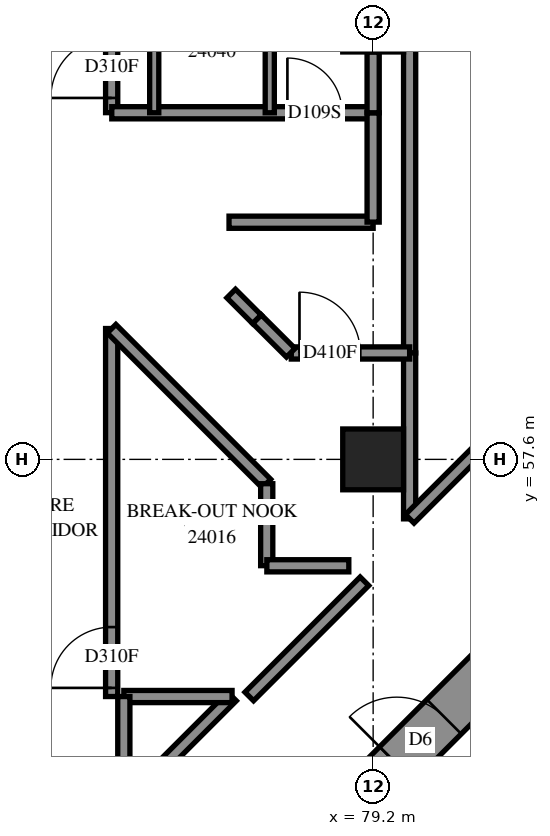
"""IFC4 building model, lengths in metres.
Left out: names, types, materials, properties, quantities, classifications, styles, units other than length and angle.
Written with IfcOpenShell. Run it as: python <this file> out.ifc"""

import sys

from ifc_helpers import new_model, si_unit, direction, frame, frame_2d, origin, origin_2d, place, context, subcontext, project, spatial, rectangle, extrude, element, fill, save


model = new_model("IFC4")
c1 = context("Model", 3, precision=1e-05, world=origin(), true_north=direction((0.0, 1.0)))
c2 = subcontext(c1, "Body", "Model", "MODEL_VIEW")
j1 = project(units=[si_unit("LENGTHUNIT", "METRE"), si_unit("PLANEANGLEUNIT", "RADIAN")], contexts=[c1])
p1 = place(None, origin())
s1 = spatial("IfcSite", under=j1, at=p1, CompositionType="ELEMENT")
p2 = place(p1, origin())
s2 = spatial("IfcBuilding", under=s1, at=p2, CompositionType="ELEMENT")
p3 = place(p2, frame((0.0, 0.0, 91.4)))
s3 = spatial("IfcBuildingStorey", under=s2, at=p3, CompositionType="ELEMENT", Elevation=91.4)
p4 = place(p3, frame((79.2, 57.6, 0.0), z_axis=(0.0, 0.0, 1.0), x_axis=(1.0, 0.0, 0.0)))
e1 = element("IfcColumn", 1, at=p4, inside=s3, PredefinedType="COLUMN", context=c2, shape_type="SweptSolid", body=[
    extrude(rectangle(XDim=1.0, YDim=1.0, at=origin_2d()), origin(), (0.0, 0.0, 1.0), 3.1),
])
p5 = place(p3, frame((76.372, 49.373, -0.3), z_axis=(0.0, 0.0, 1.0), x_axis=(0.7071067812, 0.7071067812, 0.0)))
e2 = element("IfcWall", 2, at=p5, inside=s3, PredefinedType="SHEAR", context=c2, shape_type="SweptSolid", body=[
    extrude(rectangle(XDim=14.4, YDim=0.8, at=frame_2d((7.2, 0.0))), origin(), (0.0, 0.0, 1.0), 2.7),
])
p6 = place(p5, frame((4.55, 0.0, 0.3)))
e3 = element("IfcOpeningElement", 3, at=p6, cuts=e2, PredefinedType="OPENING", context=c2, shape_type="SweptSolid", body=[
    extrude(rectangle(XDim=1.1, YDim=2.1, at=frame_2d((0.55, 1.05))), frame((0.0, 0.41, 0.0), z_axis=(0.0, -1.0, 0.0), x_axis=(1.0, 0.0, 0.0)), (0.0, 0.0, 1.0), 0.82),
])
p7 = place(p5, frame((11.35, 0.0, 0.3)))
e4 = element("IfcOpeningElement", 4, at=p7, cuts=e2, PredefinedType="OPENING", context=c2, shape_type="SweptSolid", body=[
    extrude(rectangle(XDim=1.1, YDim=2.1, at=frame_2d((0.55, 1.05))), frame((0.0, 0.41, 0.0), z_axis=(0.0, -1.0, 0.0), x_axis=(1.0, 0.0, 0.0)), (0.0, 0.0, 1.0), 0.82),
])
p8 = place(p3, frame((79.8, 59.35, 0.0), z_axis=(0.0, 0.0, 1.0), x_axis=(0.0, 1.0, 0.0)))
e5 = element("IfcWall", 5, at=p8, inside=s3, PredefinedType="PARTITIONING", context=c2, shape_type="SweptSolid", body=[
    extrude(rectangle(XDim=14.192, YDim=0.2, at=frame_2d((7.096, 0.0))), origin(), (0.0, 0.0, 1.0), 3.1),
])
p9 = place(p3, frame((74.9, 53.7, 0.0), z_axis=(0.0, 0.0, 1.0), x_axis=(0.0, 1.0, 0.0)))
e6 = element("IfcWall", 6, at=p9, inside=s3, PredefinedType="PARTITIONING", context=c2, shape_type="SweptSolid", body=[
    extrude(rectangle(XDim=6.052, YDim=0.2, at=frame_2d((3.026, 0.0))), origin(), (0.0, 0.0, 1.0), 3.1),
])
p10 = place(p9, frame((0.142, 0.0, 0.0)))
e7 = element("IfcOpeningElement", 7, at=p10, cuts=e6, PredefinedType="OPENING", context=c2, shape_type="SweptSolid", body=[
    extrude(rectangle(XDim=1.0, YDim=2.1, at=frame_2d((0.5, 1.05))), frame((0.0, 0.11, 0.0), z_axis=(0.0, -1.0, 0.0), x_axis=(1.0, 0.0, 0.0)), (0.0, 0.0, 1.0), 0.22),
])
p11 = place(p3, frame((74.9, 63.302, 0.0), z_axis=(0.0, 0.0, 1.0), x_axis=(0.0, 1.0, 0.0)))
e8 = element("IfcWall", 8, at=p11, inside=s3, PredefinedType="PARTITIONING", context=c2, shape_type="SweptSolid", body=[
    extrude(rectangle(XDim=4.398, YDim=0.2, at=frame_2d((2.199, 0.0))), origin(), (0.0, 0.0, 1.0), 3.1),
])
p12 = place(p11, frame((0.242, 0.0, 0.0)))
e9 = element("IfcOpeningElement", 9, at=p12, cuts=e8, PredefinedType="OPENING", context=c2, shape_type="SweptSolid", body=[
    extrude(rectangle(XDim=1.0, YDim=2.1, at=frame_2d((0.5, 1.05))), frame((0.0, 0.11, 0.0), z_axis=(0.0, -1.0, 0.0), x_axis=(1.0, 0.0, 0.0)), (0.0, 0.0, 1.0), 0.22),
])
p13 = place(p3, frame((74.902, 63.3, 0.0), z_axis=(0.0, 0.0, 1.0), x_axis=(1.0, 0.0, 0.0)))
e10 = element("IfcWall", 10, at=p13, inside=s3, PredefinedType="PARTITIONING", context=c2, shape_type="SweptSolid", body=[
    extrude(rectangle(XDim=4.298, YDim=0.2, at=frame_2d((2.149, 0.0))), origin(), (0.0, 0.0, 1.0), 3.1),
])
p14 = place(p13, frame((2.888, 0.0, 0.0)))
e11 = element("IfcOpeningElement", 11, at=p14, cuts=e10, PredefinedType="OPENING", context=c2, shape_type="SweptSolid", body=[
    extrude(rectangle(XDim=0.9, YDim=2.1, at=frame_2d((0.45, 1.05))), frame((0.0, 0.11, 0.0), z_axis=(0.0, -1.0, 0.0), x_axis=(1.0, 0.0, 0.0)), (0.0, 0.0, 1.0), 0.22),
])
p15 = place(p3, frame((74.899, 59.749, 0.0), z_axis=(0.0, 0.0, 1.0), x_axis=(0.7071067812, -0.7071067812, 0.0)))
e12 = element("IfcWall", 12, at=p15, inside=s3, PredefinedType="PARTITIONING", context=c2, shape_type="SweptSolid", body=[
    extrude(rectangle(XDim=3.601, YDim=0.2, at=frame_2d((1.8, 0.0))), origin(), (0.0, 0.0, 1.0), 3.1),
])
p16 = place(p3, frame((79.8, 56.622, 0.0), z_axis=(0.0, 0.0, 1.0), x_axis=(0.0, 1.0, 0.0)))
e13 = element("IfcWall", 13, at=p16, inside=s3, PredefinedType="PARTITIONING", context=c2, shape_type="SweptSolid", body=[
    extrude(rectangle(XDim=2.728, YDim=0.2, at=frame_2d((1.364, 0.0))), origin(), (0.0, 0.0, 1.0), 3.1),
])
p17 = place(p3, frame((77.163, 53.701, 0.0), z_axis=(0.0, 0.0, 1.0), x_axis=(0.7071067812, 0.7071067812, 0.0)))
e14 = element("IfcWall", 14, at=p17, inside=s3, PredefinedType="PARTITIONING", context=c2, shape_type="SweptSolid", body=[
    extrude(rectangle(XDim=2.679, YDim=0.2, at=frame_2d((1.339, 0.0))), origin(), (0.0, 0.0, 1.0), 3.1),
])
p18 = place(p3, frame((75.102, 51.922, 0.0), z_axis=(0.0, 0.0, 1.0), x_axis=(0.7071067812, 0.7071067812, 0.0)))
e15 = element("IfcWall", 15, at=p18, inside=s3, PredefinedType="PARTITIONING", context=c2, shape_type="SweptSolid", body=[
    extrude(rectangle(XDim=2.514, YDim=0.2, at=frame_2d((1.257, 0.0))), origin(), (0.0, 0.0, 1.0), 3.1),
])
for number, where, z_axis, x_axis in (
    (16, (75.6, 63.3, 0.0), (0.0, 0.0, 1.0), (0.0, 1.0, 0.0)),
    (17, (77.5, 63.3, 0.0), (0.0, 0.0, 1.0), (0.0, 1.0, 0.0)),
):
    element("IfcWall", number, at=place(p3, frame(where, z_axis=z_axis, x_axis=x_axis)), inside=s3, PredefinedType="PARTITIONING", context=c2, shape_type="SweptSolid", body=[
        extrude(rectangle(XDim=2.4, YDim=0.15, at=frame_2d((1.2, 0.0))), origin(), (0.0, 0.0, 1.0), 3.1),
    ])
p19 = place(p3, frame((76.83, 61.5, 0.0), z_axis=(0.0, 0.0, 1.0), x_axis=(1.0, 0.0, 0.0)))
e18 = element("IfcWall", 18, at=p19, inside=s3, PredefinedType="PARTITIONING", context=c2, shape_type="SweptSolid", body=[
    extrude(rectangle(XDim=2.37, YDim=0.2, at=frame_2d((1.185, 0.0))), origin(), (0.0, 0.0, 1.0), 3.1),
])
p20 = place(p3, frame((77.854, 59.35, 0.0), z_axis=(0.0, 0.0, 1.0), x_axis=(1.0, 0.0, 0.0)))
e19 = element("IfcWall", 19, at=p20, inside=s3, PredefinedType="PARTITIONING", context=c2, shape_type="SweptSolid", body=[
    extrude(rectangle(XDim=1.946, YDim=0.2, at=frame_2d((0.973, 0.0))), origin(), (0.0, 0.0, 1.0), 3.1),
])
p21 = place(p20, frame((0.135, 0.0, 0.0)))
e20 = element("IfcOpeningElement", 20, at=p21, cuts=e19, PredefinedType="OPENING", context=c2, shape_type="SweptSolid", body=[
    extrude(rectangle(XDim=1.0, YDim=2.1, at=frame_2d((0.5, 1.05))), frame((0.0, 0.11, 0.0), z_axis=(0.0, -1.0, 0.0), x_axis=(1.0, 0.0, 0.0)), (0.0, 0.0, 1.0), 0.22),
])
p22 = place(p3, frame((79.2, 61.502, 0.0), z_axis=(0.0, 0.0, 1.0), x_axis=(0.0, 1.0, 0.0)))
e21 = element("IfcWall", 21, at=p22, inside=s3, PredefinedType="PARTITIONING", context=c2, shape_type="SweptSolid", body=[
    extrude(rectangle(XDim=1.798, YDim=0.2, at=frame_2d((0.899, 0.0))), origin(), (0.0, 0.0, 1.0), 3.1),
])
p23 = place(p3, frame((75.1, 53.7, 0.0), z_axis=(0.0, 0.0, 1.0), x_axis=(1.0, 0.0, 0.0)))
e22 = element("IfcWall", 22, at=p23, inside=s3, PredefinedType="PARTITIONING", context=c2, shape_type="SweptSolid", body=[
    extrude(rectangle(XDim=1.78, YDim=0.2, at=frame_2d((0.89, 0.0))), origin(), (0.0, 0.0, 1.0), 3.1),
])
p24 = place(p3, frame((75.1, 51.922, 0.0), z_axis=(0.0, 0.0, 1.0), x_axis=(0.0, 1.0, 0.0)))
e23 = element("IfcWall", 23, at=p24, inside=s3, PredefinedType="PARTITIONING", context=c2, shape_type="SweptSolid", body=[
    extrude(rectangle(XDim=1.778, YDim=0.2, at=frame_2d((0.889, 0.0))), origin(), (0.0, 0.0, 1.0), 3.1),
])
p25 = place(p3, frame((79.802, 56.623, 0.0), z_axis=(0.0, 0.0, 1.0), x_axis=(0.7071067812, 0.7071067812, 0.0)))
e24 = element("IfcWall", 24, at=p25, inside=s3, PredefinedType="PARTITIONING", context=c2, shape_type="SweptSolid", body=[
    extrude(rectangle(XDim=1.623, YDim=0.2, at=frame_2d((0.812, 0.0))), origin(), (0.0, 0.0, 1.0), 3.1),
])
for number, where, z_axis, x_axis in (
    (25, (77.45, 55.852, 0.0), (0.0, 0.0, 1.0), (0.0, 1.0, 0.0)),
    (26, (77.452, 55.85, 0.0), (0.0, 0.0, 1.0), (1.0, 0.0, 0.0)),
):
    element("IfcWall", number, at=place(p3, frame(where, z_axis=z_axis, x_axis=x_axis)), inside=s3, PredefinedType="PARTITIONING", context=c2, shape_type="SweptSolid", body=[
        extrude(rectangle(XDim=1.348, YDim=0.2, at=frame_2d((0.674, 0.0))), origin(), (0.0, 0.0, 1.0), 3.1),
    ])
p26 = place(p3, frame((79.2, 63.3, 0.0), z_axis=(0.0, 0.0, 1.0), x_axis=(0.0, 1.0, 0.0)))
e27 = element("IfcWall", 27, at=p26, inside=s3, PredefinedType="PARTITIONING", context=c2, shape_type="SweptSolid", body=[
    extrude(rectangle(XDim=1.0, YDim=0.2, at=frame_2d((0.5, 0.0))), origin(), (0.0, 0.0, 1.0), 3.1),
])
p27 = place(p3, frame((77.289, 59.907, 0.0), z_axis=(0.0, 0.0, 1.0), x_axis=(0.7083796976, -0.7058315692, 0.0)))
e28 = element("IfcWall", 28, at=p27, inside=s3, PredefinedType="PARTITIONING", context=c2, shape_type="SweptSolid", body=[
    extrude(rectangle(XDim=0.785, YDim=0.2, at=frame_2d((0.393, 0.0))), origin(), (0.0, 0.0, 1.0), 3.1),
])
p28 = place(p3, frame((76.865, 60.327, 0.0), z_axis=(0.0, 0.0, 1.0), x_axis=(0.7071067812, -0.7071067812, 0.0)))
e29 = element("IfcWall", 29, at=p28, inside=s3, PredefinedType="PARTITIONING", context=c2, shape_type="SweptSolid", body=[
    extrude(rectangle(XDim=0.597, YDim=0.2, at=frame_2d((0.298, 0.0))), origin(), (0.0, 0.0, 1.0), 3.1),
])
p29 = place(p6, origin())
e30 = element("IfcDoor", 30, at=p29, inside=s3, OperationType="DOUBLE_DOOR_SINGLE_SWING", PredefinedType="DOOR", context=c2, shape_type="SweptSolid", body=[
    extrude(rectangle(XDim=1.1, YDim=2.1, at=frame_2d((0.55, 1.05))), frame((0.0, 0.025, 0.0), z_axis=(0.0, -1.0, 0.0), x_axis=(1.0, 0.0, 0.0)), (0.0, 0.0, 1.0), 0.05),
])
fill(e3, e30)
p30 = place(p10, origin())
e31 = element("IfcDoor", 31, at=p30, inside=s3, OperationType="SINGLE_SWING_LEFT", PredefinedType="DOOR", context=c2, shape_type="SweptSolid", body=[
    extrude(rectangle(XDim=1.0, YDim=2.1, at=frame_2d((0.5, 1.05))), frame((0.0, 0.025, 0.0), z_axis=(0.0, -1.0, 0.0), x_axis=(1.0, 0.0, 0.0)), (0.0, 0.0, 1.0), 0.05),
])
fill(e7, e31)
p31 = place(p12, origin())
e32 = element("IfcDoor", 32, at=p31, inside=s3, OperationType="SINGLE_SWING_RIGHT", PredefinedType="DOOR", context=c2, shape_type="SweptSolid", body=[
    extrude(rectangle(XDim=1.0, YDim=2.1, at=frame_2d((0.5, 1.05))), frame((0.0, 0.025, 0.0), z_axis=(0.0, -1.0, 0.0), x_axis=(1.0, 0.0, 0.0)), (0.0, 0.0, 1.0), 0.05),
])
fill(e9, e32)
p32 = place(p14, origin())
e33 = element("IfcDoor", 33, at=p32, inside=s3, OperationType="SINGLE_SWING_LEFT", PredefinedType="DOOR", context=c2, shape_type="SweptSolid", body=[
    extrude(rectangle(XDim=0.9, YDim=2.1, at=frame_2d((0.45, 1.05))), frame((0.0, 0.025, 0.0), z_axis=(0.0, -1.0, 0.0), x_axis=(1.0, 0.0, 0.0)), (0.0, 0.0, 1.0), 0.05),
])
fill(e11, e33)
p33 = place(p21, origin())
e34 = element("IfcDoor", 34, at=p33, inside=s3, OperationType="SINGLE_SWING_LEFT", PredefinedType="DOOR", context=c2, shape_type="SweptSolid", body=[
    extrude(rectangle(XDim=1.0, YDim=2.1, at=frame_2d((0.5, 1.05))), frame((0.0, 0.025, 0.0), z_axis=(0.0, -1.0, 0.0), x_axis=(1.0, 0.0, 0.0)), (0.0, 0.0, 1.0), 0.05),
])
fill(e20, e34)
save(model, sys.argv[1])
